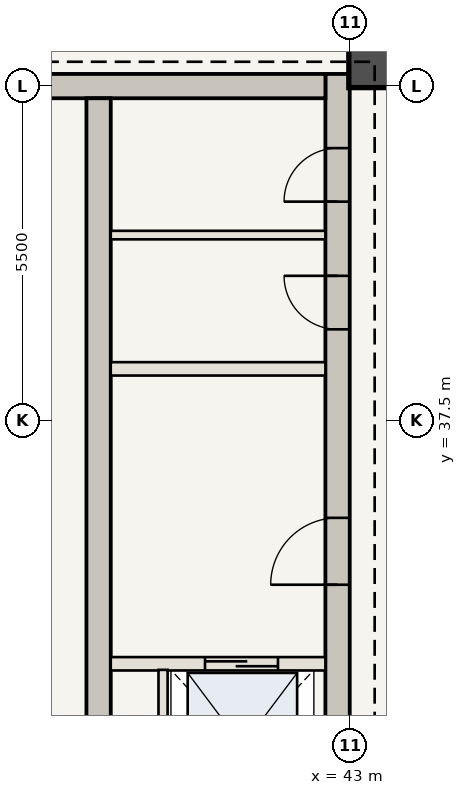
"""IFC4 building model, lengths in metres.
Left out: names, types, materials, properties, quantities, classifications, styles, units other than length and angle.
Written with IfcOpenShell. Run it as: python <this file> out.ifc"""

import sys

from ifc_helpers import new_model, si_unit, direction, frame, frame_2d, origin, origin_2d, place, context, subcontext, project, spatial, rectangle, extrude, element, fill, save


model = new_model("IFC4")
c1 = context("Model", 3, precision=1e-05, world=origin(), true_north=direction((0.0, 1.0)))
c2 = subcontext(c1, "Body", "Model", "MODEL_VIEW")
j1 = project(units=[si_unit("LENGTHUNIT", "METRE"), si_unit("PLANEANGLEUNIT", "RADIAN")], contexts=[c1])
p1 = place(None, origin())
s1 = spatial("IfcSite", under=j1, at=p1, CompositionType="ELEMENT")
p2 = place(p1, origin())
s2 = spatial("IfcBuilding", under=s1, at=p2, CompositionType="ELEMENT")
p3 = place(p2, frame((0.0, 0.0, 289.1)))
s3 = spatial("IfcBuildingStorey", under=s2, at=p3, CompositionType="ELEMENT", Elevation=289.1)
p4 = place(p3, frame((42.79, 30.6, 0.0), z_axis=(0.0, 0.0, 1.0), x_axis=(0.0, 1.0, 0.0)))
e1 = element("IfcWall", 1, at=p4, inside=s3, PredefinedType="SHEAR", context=c2, shape_type="SweptSolid", body=[
    extrude(rectangle(XDim=12.6, YDim=0.4, at=frame_2d((6.3, 0.0))), origin(), (0.0, 0.0, 1.0), 3.85),
])
p5 = place(p4, frame((4.2, 0.0, 0.0)))
e2 = element("IfcOpeningElement", 2, at=p5, cuts=e1, PredefinedType="OPENING", context=c2, shape_type="SweptSolid", body=[
    extrude(rectangle(XDim=1.1, YDim=2.15, at=frame_2d((0.55, 1.075))), frame((0.0, 0.21, 0.0), z_axis=(0.0, -1.0, 0.0), x_axis=(1.0, 0.0, 0.0)), (0.0, 0.0, 1.0), 0.42),
])
p6 = place(p4, frame((8.4, 0.0, 0.0)))
e3 = element("IfcOpeningElement", 3, at=p6, cuts=e1, PredefinedType="OPENING", context=c2, shape_type="SweptSolid", body=[
    extrude(rectangle(XDim=0.88, YDim=2.1, at=frame_2d((0.44, 1.05))), frame((0.0, 0.21, 0.0), z_axis=(0.0, -1.0, 0.0), x_axis=(1.0, 0.0, 0.0)), (0.0, 0.0, 1.0), 0.42),
])
p7 = place(p4, frame((10.5, 0.0, 0.0)))
e4 = element("IfcOpeningElement", 4, at=p7, cuts=e1, PredefinedType="OPENING", context=c2, shape_type="SweptSolid", body=[
    extrude(rectangle(XDim=0.88, YDim=2.1, at=frame_2d((0.44, 1.05))), frame((0.0, 0.21, 0.0), z_axis=(0.0, -1.0, 0.0), x_axis=(1.0, 0.0, 0.0)), (0.0, 0.0, 1.0), 0.42),
])
p8 = place(p3, frame((37.75, 43.0, 0.0), z_axis=(0.0, 0.0, 1.0), x_axis=(1.0, 0.0, 0.0)))
e5 = element("IfcWall", 5, at=p8, inside=s3, PredefinedType="SHEAR", context=c2, shape_type="SweptSolid", body=[
    extrude(rectangle(XDim=4.84, YDim=0.4, at=frame_2d((2.42, 0.0))), origin(), (0.0, 0.0, 1.0), 3.85),
])
p9 = place(p3, frame((38.86, 30.6, 0.0), z_axis=(0.0, 0.0, 1.0), x_axis=(0.0, 1.0, 0.0)))
e6 = element("IfcWall", 6, at=p9, inside=s3, PredefinedType="SHEAR", context=c2, shape_type="SweptSolid", body=[
    extrude(rectangle(XDim=12.2, YDim=0.4, at=frame_2d((6.1, 0.0))), origin(), (0.0, 0.0, 1.0), 3.85),
])
p10 = place(p3, frame((43.35, 43.35, 0.0), z_axis=(0.0, 0.0, 1.0), x_axis=(1.0, 0.0, 0.0)))
e7 = element("IfcColumn", 7, at=p10, inside=s3, PredefinedType="COLUMN", context=c2, shape_type="SweptSolid", body=[
    extrude(rectangle(XDim=0.75, YDim=0.75, at=origin_2d()), origin(), (0.0, 0.0, 1.0), 3.85),
])
p11 = place(p3, frame((39.06, 33.5, 0.0), z_axis=(0.0, 0.0, 1.0), x_axis=(1.0, 0.0, 0.0)))
e8 = element("IfcWall", 8, at=p11, inside=s3, PredefinedType="STANDARD", context=c2, shape_type="SweptSolid", body=[
    extrude(rectangle(XDim=3.53, YDim=0.22, at=frame_2d((1.765, 0.0))), origin(), (0.0, 0.0, 1.0), 3.685),
])
p12 = place(p11, frame((1.55, 0.0, 0.0)))
e9 = element("IfcOpeningElement", 9, at=p12, cuts=e8, PredefinedType="OPENING", context=c2, shape_type="SweptSolid", body=[
    extrude(rectangle(XDim=1.2, YDim=2.2, at=frame_2d((0.6, 1.1))), frame((0.0, 0.12, 0.0), z_axis=(0.0, -1.0, 0.0), x_axis=(1.0, 0.0, 0.0)), (0.0, 0.0, 1.0), 0.24),
])
p13 = place(p3, frame((39.92, 30.75, 0.0), z_axis=(0.0, 0.0, 1.0), x_axis=(0.0, 1.0, 0.0)))
e10 = element("IfcWall", 10, at=p13, inside=s3, PredefinedType="STANDARD", context=c2, shape_type="SweptSolid", body=[
    extrude(rectangle(XDim=2.65, YDim=0.15, at=frame_2d((1.325, 0.0))), origin(), (0.0, 0.0, 1.0), 3.685),
])
p14 = place(p3, frame((39.06, 38.35, 0.0), z_axis=(0.0, 0.0, 1.0), x_axis=(1.0, 0.0, 0.0)))
e11 = element("IfcWall", 11, at=p14, inside=s3, PredefinedType="STANDARD", context=c2, shape_type="SweptSolid", body=[
    extrude(rectangle(XDim=3.53, YDim=0.22, at=frame_2d((1.765, 0.0))), origin(), (0.0, 0.0, 1.0), 3.685),
])
p15 = place(p3, frame((39.06, 40.55, 0.0), z_axis=(0.0, 0.0, 1.0), x_axis=(1.0, 0.0, 0.0)))
e12 = element("IfcWall", 12, at=p15, inside=s3, PredefinedType="STANDARD", context=c2, shape_type="SweptSolid", body=[
    extrude(rectangle(XDim=3.53, YDim=0.14, at=frame_2d((1.765, 0.0))), origin(), (0.0, 0.0, 1.0), 3.685),
])
p16 = place(p5, origin())
e13 = element("IfcDoor", 13, at=p16, inside=s3, OperationType="SINGLE_SWING_LEFT", PredefinedType="DOOR", context=c2, shape_type="SweptSolid", body=[
    extrude(rectangle(XDim=1.1, YDim=2.15, at=frame_2d((0.55, 1.075))), frame((0.0, 0.025, 0.0), z_axis=(0.0, -1.0, 0.0), x_axis=(1.0, 0.0, 0.0)), (0.0, 0.0, 1.0), 0.05),
])
fill(e2, e13)
p17 = place(p6, origin())
e14 = element("IfcDoor", 14, at=p17, inside=s3, OperationType="SINGLE_SWING_RIGHT", PredefinedType="DOOR", context=c2, shape_type="SweptSolid", body=[
    extrude(rectangle(XDim=0.88, YDim=2.1, at=frame_2d((0.44, 1.05))), frame((0.0, 0.025, 0.0), z_axis=(0.0, -1.0, 0.0), x_axis=(1.0, 0.0, 0.0)), (0.0, 0.0, 1.0), 0.05),
])
fill(e3, e14)
p18 = place(p7, origin())
e15 = element("IfcDoor", 15, at=p18, inside=s3, OperationType="SINGLE_SWING_LEFT", PredefinedType="DOOR", context=c2, shape_type="SweptSolid", body=[
    extrude(rectangle(XDim=0.88, YDim=2.1, at=frame_2d((0.44, 1.05))), frame((0.0, 0.025, 0.0), z_axis=(0.0, -1.0, 0.0), x_axis=(1.0, 0.0, 0.0)), (0.0, 0.0, 1.0), 0.05),
])
fill(e4, e15)
p19 = place(p12, origin())
e16 = element("IfcDoor", 16, at=p19, inside=s3, OperationType="DOUBLE_DOOR_SLIDING", PredefinedType="DOOR", context=c2, shape_type="SweptSolid", body=[
    extrude(rectangle(XDim=1.2, YDim=2.2, at=frame_2d((0.6, 1.1))), frame((0.0, 0.025, 0.0), z_axis=(0.0, -1.0, 0.0), x_axis=(1.0, 0.0, 0.0)), (0.0, 0.0, 1.0), 0.05),
])
fill(e9, e16)
save(model, sys.argv[1])
